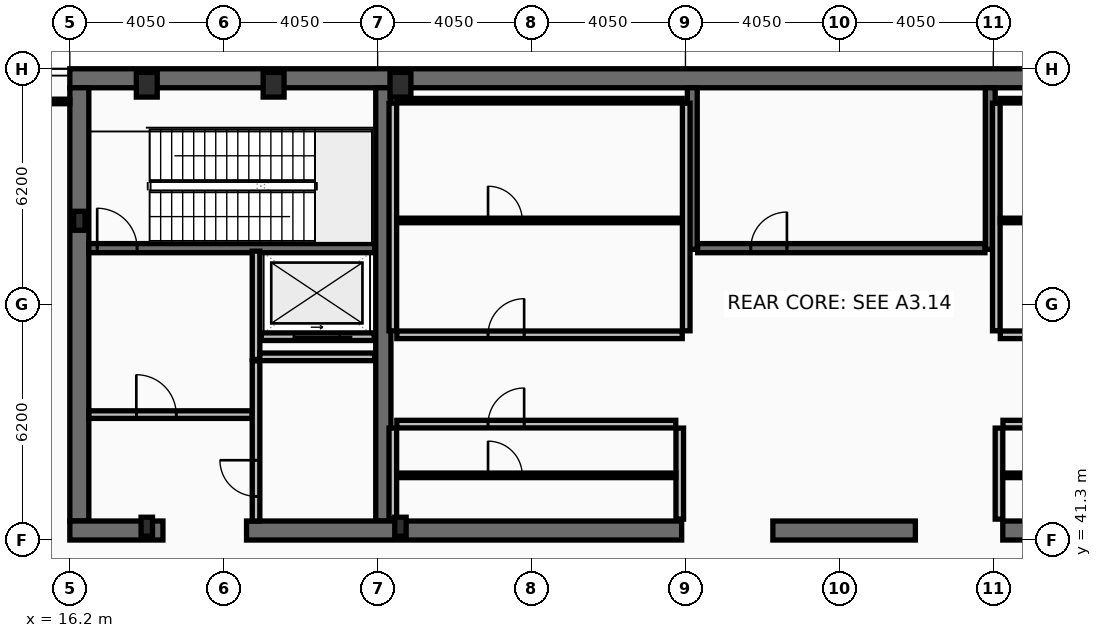
"""IFC4 building model, lengths in metres.
Left out: names, types, materials, properties, quantities, classifications, styles, units other than length and angle.
Written with IfcOpenShell. Run it as: python <this file> out.ifc"""

import sys

from ifc_helpers import new_model, si_unit, direction, frame, frame_2d, origin, origin_2d, place, context, subcontext, project, spatial, rectangle, hollow_rectangle, i_section, extrude, element, fill, save


model = new_model("IFC4")
c1 = context("Model", 3, precision=1e-05, world=origin(), true_north=direction((0.0, 1.0)))
c2 = subcontext(c1, "Body", "Model", "MODEL_VIEW")
j1 = project(units=[si_unit("LENGTHUNIT", "METRE"), si_unit("PLANEANGLEUNIT", "RADIAN")], contexts=[c1])
p1 = place(None, origin())
s1 = spatial("IfcSite", under=j1, at=p1, CompositionType="ELEMENT")
p2 = place(p1, origin())
s2 = spatial("IfcBuilding", under=s1, at=p2, CompositionType="ELEMENT")
p3 = place(p2, frame((0.0, 0.0, 373.0)))
s3 = spatial("IfcBuildingStorey", under=s2, at=p3, CompositionType="ELEMENT", Elevation=373.0)
p4 = place(p3, frame((16.2, 53.45, 0.0), z_axis=(0.0, 0.0, 1.0), x_axis=(1.0, 0.0, 0.0)))
e1 = element("IfcWall", 1, at=p4, inside=s3, PredefinedType="SHEAR", context=c2, shape_type="SweptSolid", body=[
    extrude(rectangle(XDim=40.5, YDim=0.5, at=frame_2d((20.25, 0.0))), origin(), (0.0, 0.0, 1.0), 5.4),
])
p5 = place(p3, frame((16.45, 41.8, 0.0), z_axis=(0.0, 0.0, 1.0), x_axis=(0.0, 1.0, 0.0)))
e2 = element("IfcWall", 2, at=p5, inside=s3, PredefinedType="SHEAR", context=c2, shape_type="SweptSolid", body=[
    extrude(rectangle(XDim=11.4, YDim=0.5, at=frame_2d((5.7, 0.0))), origin(), (0.0, 0.0, 1.0), 5.4),
])
p6 = place(p3, frame((24.45, 41.8, 0.0), z_axis=(0.0, 0.0, 1.0), x_axis=(0.0, 1.0, 0.0)))
e3 = element("IfcWall", 3, at=p6, inside=s3, PredefinedType="SHEAR", context=c2, shape_type="SweptSolid", body=[
    extrude(rectangle(XDim=11.4, YDim=0.4, at=frame_2d((5.7, 0.0))), origin(), (0.0, 0.0, 1.0), 5.4),
])
p7 = place(p3, frame((18.65, 41.55, 0.0), z_axis=(0.0, 0.0, 1.0), x_axis=(-1.0, 0.0, 0.0)))
e4 = element("IfcWall", 4, at=p7, inside=s3, PredefinedType="SHEAR", context=c2, shape_type="SweptSolid", body=[
    extrude(rectangle(XDim=2.45, YDim=0.5, at=frame_2d((1.225, 0.0))), origin(), (0.0, 0.0, 1.0), 5.4),
])
p8 = place(p3, frame((32.3, 41.55, 0.0), z_axis=(0.0, 0.0, 1.0), x_axis=(-1.0, 0.0, 0.0)))
e5 = element("IfcWall", 5, at=p8, inside=s3, PredefinedType="SHEAR", context=c2, shape_type="SweptSolid", body=[
    extrude(rectangle(XDim=11.45, YDim=0.5, at=frame_2d((5.725, 0.0))), origin(), (0.0, 0.0, 1.0), 5.4),
])
p9 = place(p3, frame((38.45, 41.55, 0.0), z_axis=(0.0, 0.0, 1.0), x_axis=(-1.0, 0.0, 0.0)))
e6 = element("IfcWall", 6, at=p9, inside=s3, PredefinedType="SHEAR", context=c2, shape_type="SweptSolid", body=[
    extrude(rectangle(XDim=3.75, YDim=0.5, at=frame_2d((1.875, 0.0))), origin(), (0.0, 0.0, 1.0), 5.4),
])
p10 = place(p3, frame((52.05, 41.55, 0.0), z_axis=(0.0, 0.0, 1.0), x_axis=(-1.0, 0.0, 0.0)))
e7 = element("IfcWall", 7, at=p10, inside=s3, PredefinedType="SHEAR", context=c2, shape_type="SweptSolid", body=[
    extrude(rectangle(XDim=11.3, YDim=0.5, at=frame_2d((5.65, 0.0))), origin(), (0.0, 0.0, 1.0), 5.4),
])
for number, where, z_axis, x_axis in (
    (8, (32.58, 48.95, 0.0), (0.0, 0.0, 1.0), (0.0, 1.0, 0.0)),
    (9, (40.42, 48.95, 0.0), (0.0, 0.0, 1.0), (0.0, 1.0, 0.0)),
):
    element("IfcWall", number, at=place(p3, frame(where, z_axis=z_axis, x_axis=x_axis)), inside=s3, PredefinedType="SHEAR", context=c2, shape_type="SweptSolid", body=[
        extrude(rectangle(XDim=4.25, YDim=0.26, at=frame_2d((2.125, 0.0))), origin(), (0.0, 0.0, 1.0), 5.4),
    ])
p11 = place(p3, frame((16.7, 48.98, 0.0), z_axis=(0.0, 0.0, 1.0), x_axis=(1.0, 0.0, 0.0)))
e10 = element("IfcWall", 10, at=p11, inside=s3, PredefinedType="SHEAR", context=c2, shape_type="SweptSolid", body=[
    extrude(rectangle(XDim=7.52, YDim=0.24, at=frame_2d((3.76, 0.0))), origin(), (0.0, 0.0, 1.0), 5.4),
])
p12 = place(p11, frame((0.22, 0.0, 0.0)))
e11 = element("IfcOpeningElement", 11, at=p12, cuts=e10, PredefinedType="OPENING", context=c2, shape_type="SweptSolid", body=[
    extrude(rectangle(XDim=1.05, YDim=2.15, at=frame_2d((0.525, 1.075))), frame((0.0, 0.13, 0.0), z_axis=(0.0, -1.0, 0.0), x_axis=(1.0, 0.0, 0.0)), (0.0, 0.0, 1.0), 0.26),
])
p13 = place(p3, frame((32.72, 48.98, 0.0), z_axis=(0.0, 0.0, 1.0), x_axis=(1.0, 0.0, 0.0)))
e12 = element("IfcWall", 12, at=p13, inside=s3, PredefinedType="SHEAR", context=c2, shape_type="SweptSolid", body=[
    extrude(rectangle(XDim=7.56, YDim=0.24, at=frame_2d((3.78, 0.0))), origin(), (0.0, 0.0, 1.0), 5.4),
])
p14 = place(p13, frame((1.4, 0.0, 0.0)))
e13 = element("IfcOpeningElement", 13, at=p14, cuts=e12, PredefinedType="OPENING", context=c2, shape_type="SweptSolid", body=[
    extrude(rectangle(XDim=0.95, YDim=2.1, at=frame_2d((0.475, 1.05))), frame((0.0, 0.13, 0.0), z_axis=(0.0, -1.0, 0.0), x_axis=(1.0, 0.0, 0.0)), (0.0, 0.0, 1.0), 0.26),
])
for number, where, z_axis, x_axis in (
    (14, (18.225, 53.28, 0.0), (0.0, 0.0, 1.0), (1.0, 0.0, 0.0)),
    (15, (21.562, 53.28, 0.0), (0.0, 0.0, 1.0), (1.0, 0.0, 0.0)),
    (16, (24.9, 53.28, 0.0), (0.0, 0.0, 1.0), (1.0, 0.0, 0.0)),
):
    element("IfcColumn", number, at=place(p3, frame(where, z_axis=z_axis, x_axis=x_axis)), inside=s3, PredefinedType="COLUMN", context=c2, shape_type="SweptSolid", body=[
        extrude(hollow_rectangle(XDim=0.55, YDim=0.65, WallThickness=0.04, at=origin_2d()), origin(), (0.0, 0.0, 1.0), 5.6),
    ])
for number, where, z_axis, x_axis in (
    (17, (16.45, 49.7, 0.0), (0.0, 0.0, 1.0), (1.0, 0.0, 0.0)),
    (18, (18.225, 41.65, 0.0), (0.0, 0.0, 1.0), (1.0, 0.0, 0.0)),
    (19, (24.9, 41.65, 0.0), (0.0, 0.0, 1.0), (1.0, 0.0, 0.0)),
):
    element("IfcColumn", number, at=place(p3, frame(where, z_axis=z_axis, x_axis=x_axis)), inside=s3, PredefinedType="COLUMN", context=c2, shape_type="SweptSolid", body=[
        extrude(i_section(OverallWidth=0.3, OverallDepth=0.5, WebThickness=0.014, FlangeThickness=0.028, at=origin_2d()), origin(), (0.0, 0.0, 1.0), 5.6),
    ])
p15 = place(p3, frame((24.21, 46.65, 0.0), z_axis=(0.0, 0.0, 1.0), x_axis=(-1.0, 0.0, 0.0)))
e20 = element("IfcWall", 20, at=p15, inside=s3, PredefinedType="PARTITIONING", context=c2, shape_type="SweptSolid", body=[
    extrude(rectangle(XDim=2.97, YDim=0.2, at=frame_2d((1.485, 0.0))), origin(), (0.0, 0.0, 1.0), 5.4),
])
p16 = place(p15, frame((0.91, 0.0, 0.0)))
e21 = element("IfcOpeningElement", 21, at=p16, cuts=e20, PredefinedType="OPENING", context=c2, shape_type="SweptSolid", body=[
    extrude(rectangle(XDim=1.2, YDim=2.18, at=frame_2d((0.6, 1.09))), frame((0.0, 0.11, 0.0), z_axis=(0.0, -1.0, 0.0), x_axis=(1.0, 0.0, 0.0)), (0.0, 0.0, 1.0), 0.22),
])
p17 = place(p3, frame((21.1, 46.05, 0.0), z_axis=(0.0, 0.0, 1.0), x_axis=(0.0, 1.0, 0.0)))
e22 = element("IfcWall", 22, at=p17, inside=s3, PredefinedType="PARTITIONING", context=c2, shape_type="SweptSolid", body=[
    extrude(rectangle(XDim=2.85, YDim=0.2, at=frame_2d((1.425, 0.0))), origin(), (0.0, 0.0, 1.0), 5.4),
])
p18 = place(p3, frame((16.7, 44.6, 0.0), z_axis=(0.0, 0.0, 1.0), x_axis=(1.0, 0.0, 0.0)))
e23 = element("IfcWall", 23, at=p18, inside=s3, PredefinedType="PARTITIONING", context=c2, shape_type="SweptSolid", body=[
    extrude(rectangle(XDim=4.3, YDim=0.2, at=frame_2d((2.15, 0.0))), origin(), (0.0, 0.0, 1.0), 5.4),
])
p19 = place(p18, frame((1.25, 0.0, 0.0)))
e24 = element("IfcOpeningElement", 24, at=p19, cuts=e23, PredefinedType="OPENING", context=c2, shape_type="SweptSolid", body=[
    extrude(rectangle(XDim=1.05, YDim=2.15, at=frame_2d((0.525, 1.075))), frame((0.0, 0.11, 0.0), z_axis=(0.0, -1.0, 0.0), x_axis=(1.0, 0.0, 0.0)), (0.0, 0.0, 1.0), 0.22),
])
p20 = place(p3, frame((21.2, 46.12, 0.0), z_axis=(0.0, 0.0, 1.0), x_axis=(1.0, 0.0, 0.0)))
e25 = element("IfcWall", 25, at=p20, inside=s3, PredefinedType="PARTITIONING", context=c2, shape_type="SweptSolid", body=[
    extrude(rectangle(XDim=3.02, YDim=0.2, at=frame_2d((1.51, 0.0))), origin(), (0.0, 0.0, 1.0), 5.4),
])
p21 = place(p3, frame((21.1, 41.8, 0.0), z_axis=(0.0, 0.0, 1.0), x_axis=(0.0, 1.0, 0.0)))
e26 = element("IfcWall", 26, at=p21, inside=s3, PredefinedType="PARTITIONING", context=c2, shape_type="SweptSolid", body=[
    extrude(rectangle(XDim=4.215, YDim=0.2, at=frame_2d((2.107, 0.0))), origin(), (0.0, 0.0, 1.0), 5.4),
])
p22 = place(p21, frame((0.65, 0.0, 0.0)))
e27 = element("IfcOpeningElement", 27, at=p22, cuts=e26, PredefinedType="OPENING", context=c2, shape_type="SweptSolid", body=[
    extrude(rectangle(XDim=0.95, YDim=2.1, at=frame_2d((0.475, 1.05))), frame((0.0, 0.11, 0.0), z_axis=(0.0, -1.0, 0.0), x_axis=(1.0, 0.0, 0.0)), (0.0, 0.0, 1.0), 0.22),
])
for number, where, z_axis, x_axis in (
    (28, (24.7, 46.805, 0.0), (0.0, 0.0, 1.0), (0.0, 1.0, 0.0)),
    (29, (32.42, 46.805, 0.0), (0.0, 0.0, 1.0), (0.0, 1.0, 0.0)),
):
    element("IfcWall", number, at=place(p3, frame(where, z_axis=z_axis, x_axis=x_axis)), inside=s3, PredefinedType="PARTITIONING", context=c2, shape_type="SweptSolid", body=[
        extrude(rectangle(XDim=5.99, YDim=0.2, at=frame_2d((2.995, 0.0))), origin(), (0.0, 0.0, 1.0), 5.4),
    ])
p23 = place(p3, frame((24.805, 52.86, 0.0), z_axis=(0.0, 0.0, 1.0), x_axis=(1.0, 0.0, 0.0)))
e30 = element("IfcWall", 30, at=p23, inside=s3, PredefinedType="PARTITIONING", context=c2, shape_type="SweptSolid", body=[
    extrude(rectangle(XDim=7.51, YDim=0.12, at=frame_2d((3.755, 0.0))), origin(), (0.0, 0.0, 1.0), 5.4),
])
p24 = place(p3, frame((24.805, 49.709, 0.0), z_axis=(0.0, 0.0, 1.0), x_axis=(1.0, 0.0, 0.0)))
e31 = element("IfcWall", 31, at=p24, inside=s3, PredefinedType="PARTITIONING", context=c2, shape_type="SweptSolid", body=[
    extrude(rectangle(XDim=7.51, YDim=0.12, at=frame_2d((3.755, 0.0))), origin(), (0.0, 0.0, 1.0), 5.4),
])
p25 = place(p24, frame((2.4, 0.0, 0.0)))
e32 = element("IfcOpeningElement", 32, at=p25, cuts=e31, PredefinedType="OPENING", context=c2, shape_type="SweptSolid", body=[
    extrude(rectangle(XDim=0.9, YDim=2.05, at=frame_2d((0.45, 1.025))), frame((0.0, 0.07, 0.0), z_axis=(0.0, -1.0, 0.0), x_axis=(1.0, 0.0, 0.0)), (0.0, 0.0, 1.0), 0.14),
])
p26 = place(p3, frame((24.805, 46.7, 0.0), z_axis=(0.0, 0.0, 1.0), x_axis=(1.0, 0.0, 0.0)))
e33 = element("IfcWall", 33, at=p26, inside=s3, PredefinedType="PARTITIONING", context=c2, shape_type="SweptSolid", body=[
    extrude(rectangle(XDim=7.51, YDim=0.2, at=frame_2d((3.755, 0.0))), origin(), (0.0, 0.0, 1.0), 5.4),
])
p27 = place(p26, frame((2.4, 0.0, 0.0)))
e34 = element("IfcOpeningElement", 34, at=p27, cuts=e33, PredefinedType="OPENING", context=c2, shape_type="SweptSolid", body=[
    extrude(rectangle(XDim=0.95, YDim=2.1, at=frame_2d((0.475, 1.05))), frame((0.0, 0.11, 0.0), z_axis=(0.0, -1.0, 0.0), x_axis=(1.0, 0.0, 0.0)), (0.0, 0.0, 1.0), 0.22),
])
for number, where, z_axis, x_axis in (
    (35, (24.7, 41.85, 0.0), (0.0, 0.0, 1.0), (0.0, 1.0, 0.0)),
    (36, (32.25, 41.85, 0.0), (0.0, 0.0, 1.0), (0.0, 1.0, 0.0)),
):
    element("IfcWall", number, at=place(p3, frame(where, z_axis=z_axis, x_axis=x_axis)), inside=s3, PredefinedType="PARTITIONING", context=c2, shape_type="SweptSolid", body=[
        extrude(rectangle(XDim=2.395, YDim=0.2, at=frame_2d((1.198, 0.0))), origin(), (0.0, 0.0, 1.0), 5.4),
    ])
p28 = place(p3, frame((24.805, 43.002, 0.0), z_axis=(0.0, 0.0, 1.0), x_axis=(1.0, 0.0, 0.0)))
e37 = element("IfcWall", 37, at=p28, inside=s3, PredefinedType="PARTITIONING", context=c2, shape_type="SweptSolid", body=[
    extrude(rectangle(XDim=7.34, YDim=0.12, at=frame_2d((3.67, 0.0))), origin(), (0.0, 0.0, 1.0), 5.4),
])
p29 = place(p28, frame((2.4, 0.0, 0.0)))
e38 = element("IfcOpeningElement", 38, at=p29, cuts=e37, PredefinedType="OPENING", context=c2, shape_type="SweptSolid", body=[
    extrude(rectangle(XDim=0.9, YDim=2.05, at=frame_2d((0.45, 1.025))), frame((0.0, 0.07, 0.0), z_axis=(0.0, -1.0, 0.0), x_axis=(1.0, 0.0, 0.0)), (0.0, 0.0, 1.0), 0.14),
])
p30 = place(p3, frame((24.805, 44.35, 0.0), z_axis=(0.0, 0.0, 1.0), x_axis=(1.0, 0.0, 0.0)))
e39 = element("IfcWall", 39, at=p30, inside=s3, PredefinedType="PARTITIONING", context=c2, shape_type="SweptSolid", body=[
    extrude(rectangle(XDim=7.34, YDim=0.2, at=frame_2d((3.67, 0.0))), origin(), (0.0, 0.0, 1.0), 5.4),
])
p31 = place(p30, frame((2.4, 0.0, 0.0)))
e40 = element("IfcOpeningElement", 40, at=p31, cuts=e39, PredefinedType="OPENING", context=c2, shape_type="SweptSolid", body=[
    extrude(rectangle(XDim=0.95, YDim=2.1, at=frame_2d((0.475, 1.05))), frame((0.0, 0.11, 0.0), z_axis=(0.0, -1.0, 0.0), x_axis=(1.0, 0.0, 0.0)), (0.0, 0.0, 1.0), 0.22),
])
p32 = place(p3, frame((40.58, 46.805, 0.0), z_axis=(0.0, 0.0, 1.0), x_axis=(0.0, 1.0, 0.0)))
e41 = element("IfcWall", 41, at=p32, inside=s3, PredefinedType="PARTITIONING", context=c2, shape_type="SweptSolid", body=[
    extrude(rectangle(XDim=5.99, YDim=0.2, at=frame_2d((2.995, 0.0))), origin(), (0.0, 0.0, 1.0), 5.4),
])
p33 = place(p3, frame((40.685, 52.86, 0.0), z_axis=(0.0, 0.0, 1.0), x_axis=(1.0, 0.0, 0.0)))
e42 = element("IfcWall", 42, at=p33, inside=s3, PredefinedType="PARTITIONING", context=c2, shape_type="SweptSolid", body=[
    extrude(rectangle(XDim=7.35, YDim=0.12, at=frame_2d((3.675, 0.0))), origin(), (0.0, 0.0, 1.0), 5.4),
])
p34 = place(p3, frame((40.685, 49.709, 0.0), z_axis=(0.0, 0.0, 1.0), x_axis=(1.0, 0.0, 0.0)))
e43 = element("IfcWall", 43, at=p34, inside=s3, PredefinedType="PARTITIONING", context=c2, shape_type="SweptSolid", body=[
    extrude(rectangle(XDim=7.35, YDim=0.12, at=frame_2d((3.675, 0.0))), origin(), (0.0, 0.0, 1.0), 5.4),
])
p35 = place(p34, frame((2.4, 0.0, 0.0)))
e44 = element("IfcOpeningElement", 44, at=p35, cuts=e43, PredefinedType="OPENING", context=c2, shape_type="SweptSolid", body=[
    extrude(rectangle(XDim=0.9, YDim=2.05, at=frame_2d((0.45, 1.025))), frame((0.0, 0.07, 0.0), z_axis=(0.0, -1.0, 0.0), x_axis=(1.0, 0.0, 0.0)), (0.0, 0.0, 1.0), 0.14),
])
p36 = place(p3, frame((40.685, 46.7, 0.0), z_axis=(0.0, 0.0, 1.0), x_axis=(1.0, 0.0, 0.0)))
e45 = element("IfcWall", 45, at=p36, inside=s3, PredefinedType="PARTITIONING", context=c2, shape_type="SweptSolid", body=[
    extrude(rectangle(XDim=7.35, YDim=0.2, at=frame_2d((3.675, 0.0))), origin(), (0.0, 0.0, 1.0), 5.4),
])
p37 = place(p36, frame((2.4, 0.0, 0.0)))
e46 = element("IfcOpeningElement", 46, at=p37, cuts=e45, PredefinedType="OPENING", context=c2, shape_type="SweptSolid", body=[
    extrude(rectangle(XDim=0.95, YDim=2.1, at=frame_2d((0.475, 1.05))), frame((0.0, 0.11, 0.0), z_axis=(0.0, -1.0, 0.0), x_axis=(1.0, 0.0, 0.0)), (0.0, 0.0, 1.0), 0.22),
])
p38 = place(p3, frame((40.65, 41.85, 0.0), z_axis=(0.0, 0.0, 1.0), x_axis=(0.0, 1.0, 0.0)))
e47 = element("IfcWall", 47, at=p38, inside=s3, PredefinedType="PARTITIONING", context=c2, shape_type="SweptSolid", body=[
    extrude(rectangle(XDim=2.395, YDim=0.2, at=frame_2d((1.198, 0.0))), origin(), (0.0, 0.0, 1.0), 5.4),
])
p39 = place(p3, frame((40.755, 43.002, 0.0), z_axis=(0.0, 0.0, 1.0), x_axis=(1.0, 0.0, 0.0)))
e48 = element("IfcWall", 48, at=p39, inside=s3, PredefinedType="PARTITIONING", context=c2, shape_type="SweptSolid", body=[
    extrude(rectangle(XDim=7.28, YDim=0.12, at=frame_2d((3.64, 0.0))), origin(), (0.0, 0.0, 1.0), 5.4),
])
p40 = place(p39, frame((2.4, 0.0, 0.0)))
e49 = element("IfcOpeningElement", 49, at=p40, cuts=e48, PredefinedType="OPENING", context=c2, shape_type="SweptSolid", body=[
    extrude(rectangle(XDim=0.9, YDim=2.05, at=frame_2d((0.45, 1.025))), frame((0.0, 0.07, 0.0), z_axis=(0.0, -1.0, 0.0), x_axis=(1.0, 0.0, 0.0)), (0.0, 0.0, 1.0), 0.14),
])
p41 = place(p3, frame((40.755, 44.35, 0.0), z_axis=(0.0, 0.0, 1.0), x_axis=(1.0, 0.0, 0.0)))
e50 = element("IfcWall", 50, at=p41, inside=s3, PredefinedType="PARTITIONING", context=c2, shape_type="SweptSolid", body=[
    extrude(rectangle(XDim=7.28, YDim=0.2, at=frame_2d((3.64, 0.0))), origin(), (0.0, 0.0, 1.0), 5.4),
])
p42 = place(p41, frame((2.4, 0.0, 0.0)))
e51 = element("IfcOpeningElement", 51, at=p42, cuts=e50, PredefinedType="OPENING", context=c2, shape_type="SweptSolid", body=[
    extrude(rectangle(XDim=0.95, YDim=2.1, at=frame_2d((0.475, 1.05))), frame((0.0, 0.11, 0.0), z_axis=(0.0, -1.0, 0.0), x_axis=(1.0, 0.0, 0.0)), (0.0, 0.0, 1.0), 0.22),
])
p43 = place(p3, frame((12.095, 52.84, 0.0), z_axis=(0.0, 0.0, 1.0), x_axis=(1.0, 0.0, 0.0)))
e52 = element("IfcWall", 52, at=p43, inside=s3, PredefinedType="PARTITIONING", context=c2, shape_type="SweptSolid", body=[
    extrude(rectangle(XDim=4.105, YDim=0.12, at=frame_2d((2.052, 0.0))), origin(), (0.0, 0.0, 1.0), 5.4),
])
p44 = place(p12, origin())
e53 = element("IfcDoor", 53, at=p44, inside=s3, OperationType="SINGLE_SWING_LEFT", PredefinedType="DOOR", context=c2, shape_type="SweptSolid", body=[
    extrude(rectangle(XDim=1.05, YDim=2.15, at=frame_2d((0.525, 1.075))), frame((0.0, 0.025, 0.0), z_axis=(0.0, -1.0, 0.0), x_axis=(1.0, 0.0, 0.0)), (0.0, 0.0, 1.0), 0.05),
])
fill(e11, e53)
p45 = place(p14, origin())
e54 = element("IfcDoor", 54, at=p45, inside=s3, OperationType="SINGLE_SWING_RIGHT", PredefinedType="DOOR", context=c2, shape_type="SweptSolid", body=[
    extrude(rectangle(XDim=0.95, YDim=2.1, at=frame_2d((0.475, 1.05))), frame((0.0, 0.025, 0.0), z_axis=(0.0, -1.0, 0.0), x_axis=(1.0, 0.0, 0.0)), (0.0, 0.0, 1.0), 0.05),
])
fill(e13, e54)
p46 = place(p16, origin())
e55 = element("IfcDoor", 55, at=p46, inside=s3, OperationType="SLIDING_TO_LEFT", PredefinedType="DOOR", context=c2, shape_type="SweptSolid", body=[
    extrude(rectangle(XDim=1.2, YDim=2.18, at=frame_2d((0.6, 1.09))), frame((0.0, 0.025, 0.0), z_axis=(0.0, -1.0, 0.0), x_axis=(1.0, 0.0, 0.0)), (0.0, 0.0, 1.0), 0.05),
])
fill(e21, e55)
p47 = place(p19, origin())
e56 = element("IfcDoor", 56, at=p47, inside=s3, OperationType="SINGLE_SWING_LEFT", PredefinedType="DOOR", context=c2, shape_type="SweptSolid", body=[
    extrude(rectangle(XDim=1.05, YDim=2.15, at=frame_2d((0.525, 1.075))), frame((0.0, 0.025, 0.0), z_axis=(0.0, -1.0, 0.0), x_axis=(1.0, 0.0, 0.0)), (0.0, 0.0, 1.0), 0.05),
])
fill(e24, e56)
p48 = place(p22, origin())
e57 = element("IfcDoor", 57, at=p48, inside=s3, OperationType="SINGLE_SWING_RIGHT", PredefinedType="DOOR", context=c2, shape_type="SweptSolid", body=[
    extrude(rectangle(XDim=0.95, YDim=2.1, at=frame_2d((0.475, 1.05))), frame((0.0, 0.025, 0.0), z_axis=(0.0, -1.0, 0.0), x_axis=(1.0, 0.0, 0.0)), (0.0, 0.0, 1.0), 0.05),
])
fill(e27, e57)
p49 = place(p25, origin())
e58 = element("IfcDoor", 58, at=p49, inside=s3, OperationType="SINGLE_SWING_LEFT", PredefinedType="DOOR", context=c2, shape_type="SweptSolid", body=[
    extrude(rectangle(XDim=0.9, YDim=2.05, at=frame_2d((0.45, 1.025))), frame((0.0, 0.025, 0.0), z_axis=(0.0, -1.0, 0.0), x_axis=(1.0, 0.0, 0.0)), (0.0, 0.0, 1.0), 0.05),
])
fill(e32, e58)
p50 = place(p27, origin())
e59 = element("IfcDoor", 59, at=p50, inside=s3, OperationType="SINGLE_SWING_RIGHT", PredefinedType="DOOR", context=c2, shape_type="SweptSolid", body=[
    extrude(rectangle(XDim=0.95, YDim=2.1, at=frame_2d((0.475, 1.05))), frame((0.0, 0.025, 0.0), z_axis=(0.0, -1.0, 0.0), x_axis=(1.0, 0.0, 0.0)), (0.0, 0.0, 1.0), 0.05),
])
fill(e34, e59)
p51 = place(p29, origin())
e60 = element("IfcDoor", 60, at=p51, inside=s3, OperationType="SINGLE_SWING_LEFT", PredefinedType="DOOR", context=c2, shape_type="SweptSolid", body=[
    extrude(rectangle(XDim=0.9, YDim=2.05, at=frame_2d((0.45, 1.025))), frame((0.0, 0.025, 0.0), z_axis=(0.0, -1.0, 0.0), x_axis=(1.0, 0.0, 0.0)), (0.0, 0.0, 1.0), 0.05),
])
fill(e38, e60)
p52 = place(p31, origin())
e61 = element("IfcDoor", 61, at=p52, inside=s3, OperationType="SINGLE_SWING_RIGHT", PredefinedType="DOOR", context=c2, shape_type="SweptSolid", body=[
    extrude(rectangle(XDim=0.95, YDim=2.1, at=frame_2d((0.475, 1.05))), frame((0.0, 0.025, 0.0), z_axis=(0.0, -1.0, 0.0), x_axis=(1.0, 0.0, 0.0)), (0.0, 0.0, 1.0), 0.05),
])
fill(e40, e61)
save(model, sys.argv[1])
